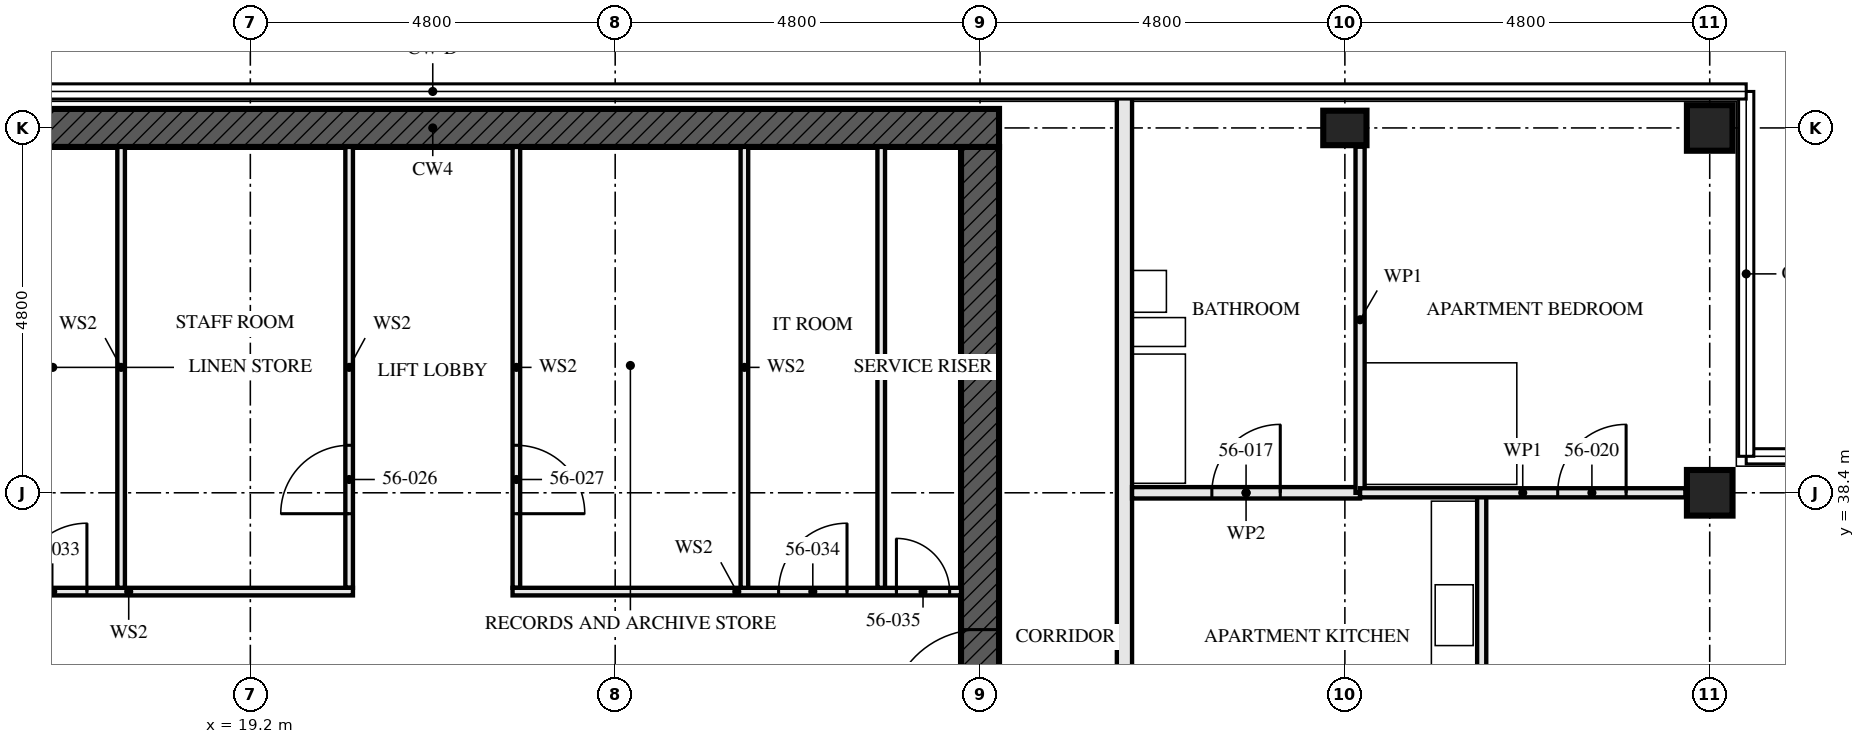
"""IFC4 building model, lengths in metres.
Left out: names, types, materials, properties, quantities, classifications, styles, units other than length and angle.
Written with IfcOpenShell. Run it as: python <this file> out.ifc"""

import sys

from ifc_helpers import new_model, si_unit, direction, frame, frame_2d, origin, origin_2d, place, context, subcontext, project, spatial, rectangle, hollow_rectangle, i_section, extrude, element, fill, save


model = new_model("IFC4")
c1 = context("Model", 3, precision=1e-05, world=origin(), true_north=direction((0.0, 1.0)))
c2 = subcontext(c1, "Body", "Model", "MODEL_VIEW")
j1 = project(units=[si_unit("LENGTHUNIT", "METRE"), si_unit("PLANEANGLEUNIT", "RADIAN")], contexts=[c1])
p1 = place(None, origin())
s1 = spatial("IfcSite", under=j1, at=p1, CompositionType="ELEMENT")
p2 = place(p1, origin())
s2 = spatial("IfcBuilding", under=s1, at=p2, CompositionType="ELEMENT")
p3 = place(p2, frame((0.0, 0.0, 205.0)))
s3 = spatial("IfcBuildingStorey", under=s2, at=p3, CompositionType="ELEMENT", Elevation=205.0)
p4 = place(p3, frame((33.6, 43.2, 0.0), z_axis=(0.0, 0.0, 1.0), x_axis=(0.0, 1.0, 0.0)))
e1 = element("IfcColumn", 1, at=p4, inside=s3, PredefinedType="COLUMN", context=c2, shape_type="SweptSolid", body=[
    extrude(i_section(OverallWidth=0.454, OverallDepth=0.569, WebThickness=0.078, FlangeThickness=0.125, FilletRadius=0.015, at=origin_2d()), origin(), (0.0, 0.0, 1.0), 3.5),
])
for number, where, z_axis, x_axis in (
    (2, (38.4, 38.4, 0.0), (0.0, 0.0, 1.0), (0.0, 1.0, 0.0)),
    (3, (38.4, 43.2, 0.0), (0.0, 0.0, 1.0), (0.0, 1.0, 0.0)),
):
    element("IfcColumn", number, at=place(p3, frame(where, z_axis=z_axis, x_axis=x_axis)), inside=s3, PredefinedType="COLUMN", context=c2, shape_type="SweptSolid", body=[
        extrude(hollow_rectangle(XDim=0.6, YDim=0.6, WallThickness=0.05, at=origin_2d()), origin(), (0.0, 0.0, 1.0), 3.5),
    ])
p5 = place(p3, frame((29.05, 43.2, -0.17), z_axis=(0.0, 0.0, 1.0), x_axis=(-1.0, 0.0, 0.0)))
e4 = element("IfcWall", 4, at=p5, inside=s3, PredefinedType="SHEAR", context=c2, shape_type="SweptSolid", body=[
    extrude(rectangle(XDim=14.9, YDim=0.5, at=frame_2d((7.45, 0.0))), origin(), (0.0, 0.0, 1.0), 3.5),
])
p6 = place(p3, frame((28.8, 29.05, -0.17), z_axis=(0.0, 0.0, 1.0), x_axis=(0.0, 1.0, 0.0)))
e5 = element("IfcWall", 5, at=p6, inside=s3, PredefinedType="SHEAR", context=c2, shape_type="SweptSolid", body=[
    extrude(rectangle(XDim=13.9, YDim=0.5, at=frame_2d((6.95, 0.0))), origin(), (0.0, 0.0, 1.0), 3.5),
])
p7 = place(p6, frame((6.35, 0.0, 0.17)))
e6 = element("IfcOpeningElement", 6, at=p7, cuts=e5, PredefinedType="OPENING", context=c2, shape_type="SweptSolid", body=[
    extrude(rectangle(XDim=1.2, YDim=2.1, at=frame_2d((0.6, 1.05))), frame((0.0, 0.26, 0.0), z_axis=(0.0, -1.0, 0.0), x_axis=(1.0, 0.0, 0.0)), (0.0, 0.0, 1.0), 0.521),
])
p8 = place(p3, frame((33.8, 38.4, 0.0), z_axis=(0.0, 0.0, 1.0), x_axis=(-1.0, 0.0, 0.0)))
e7 = element("IfcWall", 7, at=p8, inside=s3, PredefinedType="PARTITIONING", context=c2, shape_type="SweptSolid", body=[
    extrude(rectangle(XDim=3.0, YDim=0.15, at=frame_2d((1.5, 0.0))), origin(), (0.0, 0.0, 1.0), 2.55),
])
p9 = place(p8, frame((1.05, 0.0, 0.0)))
e8 = element("IfcOpeningElement", 8, at=p9, cuts=e7, PredefinedType="OPENING", context=c2, shape_type="SweptSolid", body=[
    extrude(rectangle(XDim=0.9, YDim=2.1, at=frame_2d((0.45, 1.05))), frame((0.0, 0.085, 0.0), z_axis=(0.0, -1.0, 0.0), x_axis=(1.0, 0.0, 0.0)), (0.0, 0.0, 1.0), 0.171),
])
p10 = place(p3, frame((35.4, 33.6, 0.0), z_axis=(0.0, 0.0, 1.0), x_axis=(0.0, 1.0, 0.0)))
e9 = element("IfcWall", 9, at=p10, inside=s3, PredefinedType="PARTITIONING", context=c2, shape_type="SweptSolid", body=[
    extrude(rectangle(XDim=4.8, YDim=0.12, at=frame_2d((2.4, 0.0))), origin(), (0.0, 0.0, 1.0), 3.33),
])
p11 = place(p10, frame((0.45, 0.0, 0.0)))
e10 = element("IfcOpeningElement", 10, at=p11, cuts=e9, PredefinedType="OPENING", context=c2, shape_type="SweptSolid", body=[
    extrude(rectangle(XDim=0.9, YDim=2.1, at=frame_2d((0.45, 1.05))), frame((0.0, 0.071, 0.0), z_axis=(0.0, -1.0, 0.0), x_axis=(1.0, 0.0, 0.0)), (0.0, 0.0, 1.0), 0.141),
])
p12 = place(p3, frame((33.8, 38.4, 0.0), z_axis=(0.0, 0.0, 1.0), x_axis=(0.0, 1.0, 0.0)))
e11 = element("IfcWall", 11, at=p12, inside=s3, PredefinedType="PARTITIONING", context=c2, shape_type="SweptSolid", body=[
    extrude(rectangle(XDim=4.553, YDim=0.12, at=frame_2d((2.276, 0.0))), origin(), (0.0, 0.0, 1.0), 3.33),
])
p13 = place(p3, frame((38.08, 38.4, 0.0), z_axis=(0.0, 0.0, 1.0), x_axis=(-1.0, 0.0, 0.0)))
e12 = element("IfcWall", 12, at=p13, inside=s3, PredefinedType="PARTITIONING", context=c2, shape_type="SweptSolid", body=[
    extrude(rectangle(XDim=4.28, YDim=0.12, at=frame_2d((2.14, 0.0))), origin(), (0.0, 0.0, 1.0), 2.55),
])
p14 = place(p13, frame((0.78, 0.0, 0.0)))
e13 = element("IfcOpeningElement", 13, at=p14, cuts=e12, PredefinedType="OPENING", context=c2, shape_type="SweptSolid", body=[
    extrude(rectangle(XDim=0.9, YDim=2.1, at=frame_2d((0.45, 1.05))), frame((0.0, 0.071, 0.0), z_axis=(0.0, -1.0, 0.0), x_axis=(1.0, 0.0, 0.0)), (0.0, 0.0, 1.0), 0.141),
])
p15 = place(p3, frame((30.7, 28.345, 0.0), z_axis=(0.0, 0.0, 1.0), x_axis=(0.0, 1.0, 0.0)))
e14 = element("IfcWall", 14, at=p15, inside=s3, PredefinedType="PARTITIONING", context=c2, shape_type="SweptSolid", body=[
    extrude(rectangle(XDim=15.31, YDim=0.2, at=frame_2d((7.655, 0.0))), origin(), (0.0, 0.0, 1.0), 2.32),
])
p16 = place(p15, frame((1.855, 0.0, 0.0)))
e15 = element("IfcOpeningElement", 15, at=p16, cuts=e14, PredefinedType="OPENING", context=c2, shape_type="SweptSolid", body=[
    extrude(rectangle(XDim=1.0, YDim=2.1, at=frame_2d((0.5, 1.05))), frame((0.0, 0.111, 0.0), z_axis=(0.0, -1.0, 0.0), x_axis=(1.0, 0.0, 0.0)), (0.0, 0.0, 1.0), 0.221),
])
p17 = place(p15, frame((4.555, 0.0, 0.0)))
e16 = element("IfcOpeningElement", 16, at=p17, cuts=e14, PredefinedType="OPENING", context=c2, shape_type="SweptSolid", body=[
    extrude(rectangle(XDim=1.0, YDim=2.1, at=frame_2d((0.5, 1.05))), frame((0.0, 0.111, 0.0), z_axis=(0.0, -1.0, 0.0), x_axis=(1.0, 0.0, 0.0)), (0.0, 0.0, 1.0), 0.221),
])
p18 = place(p15, frame((6.43, 0.0, 0.0)))
e17 = element("IfcOpeningElement", 17, at=p18, cuts=e14, PredefinedType="OPENING", context=c2, shape_type="SweptSolid", body=[
    extrude(rectangle(XDim=1.0, YDim=2.1, at=frame_2d((0.5, 1.05))), frame((0.0, 0.111, 0.0), z_axis=(0.0, -1.0, 0.0), x_axis=(1.0, 0.0, 0.0)), (0.0, 0.0, 1.0), 0.221),
])
p19 = place(p3, frame((27.5, 37.15, 0.0), z_axis=(0.0, 0.0, 1.0), x_axis=(0.0, 1.0, 0.0)))
e18 = element("IfcWall", 18, at=p19, inside=s3, PredefinedType="SOLIDWALL", context=c2, shape_type="SweptSolid", body=[
    extrude(rectangle(XDim=5.8, YDim=0.1, at=frame_2d((2.9, 0.0))), origin(), (0.0, 0.0, 1.0), 3.33),
])
p20 = place(p3, frame((20.5, 37.15, 0.0), z_axis=(0.0, 0.0, 1.0), x_axis=(0.0, 1.0, 0.0)))
e19 = element("IfcWall", 19, at=p20, inside=s3, PredefinedType="SOLIDWALL", context=c2, shape_type="SweptSolid", body=[
    extrude(rectangle(XDim=5.8, YDim=0.1, at=frame_2d((2.9, 0.0))), origin(), (0.0, 0.0, 1.0), 3.33),
])
p21 = place(p20, frame((0.975, 0.0, 0.0)))
e20 = element("IfcOpeningElement", 20, at=p21, cuts=e19, PredefinedType="OPENING", context=c2, shape_type="SweptSolid", body=[
    extrude(rectangle(XDim=0.9, YDim=2.1, at=frame_2d((0.45, 1.05))), frame((0.0, 0.061, 0.0), z_axis=(0.0, -1.0, 0.0), x_axis=(1.0, 0.0, 0.0)), (0.0, 0.0, 1.0), 0.121),
])
p22 = place(p3, frame((22.7, 37.15, 0.0), z_axis=(0.0, 0.0, 1.0), x_axis=(0.0, 1.0, 0.0)))
e21 = element("IfcWall", 21, at=p22, inside=s3, PredefinedType="SOLIDWALL", context=c2, shape_type="SweptSolid", body=[
    extrude(rectangle(XDim=5.8, YDim=0.1, at=frame_2d((2.9, 0.0))), origin(), (0.0, 0.0, 1.0), 3.33),
])
p23 = place(p22, frame((0.975, 0.0, 0.0)))
e22 = element("IfcOpeningElement", 22, at=p23, cuts=e21, PredefinedType="OPENING", context=c2, shape_type="SweptSolid", body=[
    extrude(rectangle(XDim=0.9, YDim=2.1, at=frame_2d((0.45, 1.05))), frame((0.0, 0.061, 0.0), z_axis=(0.0, -1.0, 0.0), x_axis=(1.0, 0.0, 0.0)), (0.0, 0.0, 1.0), 0.121),
])
p24 = place(p3, frame((14.65, 37.1, 0.0), z_axis=(0.0, 0.0, 1.0), x_axis=(1.0, 0.0, 0.0)))
e23 = element("IfcWall", 23, at=p24, inside=s3, PredefinedType="SOLIDWALL", context=c2, shape_type="SweptSolid", body=[
    extrude(rectangle(XDim=5.9, YDim=0.1, at=frame_2d((2.95, 0.0))), origin(), (0.0, 0.0, 1.0), 3.33),
])
p25 = place(p24, frame((0.15, 0.0, 0.0)))
e24 = element("IfcOpeningElement", 24, at=p25, cuts=e23, PredefinedType="OPENING", context=c2, shape_type="SweptSolid", body=[
    extrude(rectangle(XDim=0.7, YDim=2.1, at=frame_2d((0.35, 1.05))), frame((0.0, 0.061, 0.0), z_axis=(0.0, -1.0, 0.0), x_axis=(1.0, 0.0, 0.0)), (0.0, 0.0, 1.0), 0.121),
])
p26 = place(p24, frame((1.5, 0.0, 0.0)))
e25 = element("IfcOpeningElement", 25, at=p26, cuts=e23, PredefinedType="OPENING", context=c2, shape_type="SweptSolid", body=[
    extrude(rectangle(XDim=0.9, YDim=2.1, at=frame_2d((0.45, 1.05))), frame((0.0, 0.061, 0.0), z_axis=(0.0, -1.0, 0.0), x_axis=(1.0, 0.0, 0.0)), (0.0, 0.0, 1.0), 0.121),
])
p27 = place(p3, frame((22.65, 37.1, 0.0), z_axis=(0.0, 0.0, 1.0), x_axis=(1.0, 0.0, 0.0)))
e26 = element("IfcWall", 26, at=p27, inside=s3, PredefinedType="SOLIDWALL", context=c2, shape_type="SweptSolid", body=[
    extrude(rectangle(XDim=5.9, YDim=0.1, at=frame_2d((2.95, 0.0))), origin(), (0.0, 0.0, 1.0), 3.33),
])
p28 = place(p27, frame((3.5, 0.0, 0.0)))
e27 = element("IfcOpeningElement", 27, at=p28, cuts=e26, PredefinedType="OPENING", context=c2, shape_type="SweptSolid", body=[
    extrude(rectangle(XDim=0.9, YDim=2.1, at=frame_2d((0.45, 1.05))), frame((0.0, 0.061, 0.0), z_axis=(0.0, -1.0, 0.0), x_axis=(1.0, 0.0, 0.0)), (0.0, 0.0, 1.0), 0.121),
])
p29 = place(p27, frame((5.05, 0.0, 0.0)))
e28 = element("IfcOpeningElement", 28, at=p29, cuts=e26, PredefinedType="OPENING", context=c2, shape_type="SweptSolid", body=[
    extrude(rectangle(XDim=0.7, YDim=2.1, at=frame_2d((0.35, 1.05))), frame((0.0, 0.061, 0.0), z_axis=(0.0, -1.0, 0.0), x_axis=(1.0, 0.0, 0.0)), (0.0, 0.0, 1.0), 0.121),
])
for number, where, z_axis, x_axis in (
    (29, (17.5, 37.15, 0.0), (0.0, 0.0, 1.0), (0.0, 1.0, 0.0)),
    (30, (25.7, 37.15, 0.0), (0.0, 0.0, 1.0), (0.0, 1.0, 0.0)),
):
    element("IfcWall", number, at=place(p3, frame(where, z_axis=z_axis, x_axis=x_axis)), inside=s3, PredefinedType="SOLIDWALL", context=c2, shape_type="SweptSolid", body=[
        extrude(rectangle(XDim=5.8, YDim=0.1, at=frame_2d((2.9, 0.0))), origin(), (0.0, 0.0, 1.0), 3.33),
    ])
p30 = place(p9, frame((0.9, 0.0, 0.0), z_axis=(0.0, 0.0, 1.0), x_axis=(-1.0, 0.0, 0.0)))
e31 = element("IfcDoor", 31, at=p30, inside=s3, OperationType="SINGLE_SWING_LEFT", PredefinedType="DOOR", context=c2, shape_type="SweptSolid", body=[
    extrude(rectangle(XDim=0.9, YDim=2.1, at=frame_2d((0.45, 1.05))), frame((0.0, 0.022, 0.0), z_axis=(0.0, -1.0, 0.0), x_axis=(1.0, 0.0, 0.0)), (0.0, 0.0, 1.0), 0.044),
])
fill(e8, e31)
p31 = place(p14, frame((0.9, 0.0, 0.0), z_axis=(0.0, 0.0, 1.0), x_axis=(-1.0, 0.0, 0.0)))
e32 = element("IfcDoor", 32, at=p31, inside=s3, OperationType="SINGLE_SWING_LEFT", PredefinedType="DOOR", context=c2, shape_type="SweptSolid", body=[
    extrude(rectangle(XDim=0.9, YDim=2.1, at=frame_2d((0.45, 1.05))), frame((0.0, 0.022, 0.0), z_axis=(0.0, -1.0, 0.0), x_axis=(1.0, 0.0, 0.0)), (0.0, 0.0, 1.0), 0.044),
])
fill(e13, e32)
p32 = place(p21, origin())
e33 = element("IfcDoor", 33, at=p32, inside=s3, OperationType="SINGLE_SWING_RIGHT", PredefinedType="DOOR", context=c2, shape_type="SweptSolid", body=[
    extrude(rectangle(XDim=0.9, YDim=2.1, at=frame_2d((0.45, 1.05))), frame((0.0, 0.027, 0.0), z_axis=(0.0, -1.0, 0.0), x_axis=(1.0, 0.0, 0.0)), (0.0, 0.0, 1.0), 0.054),
])
fill(e20, e33)
p33 = place(p23, frame((0.9, 0.0, 0.0), z_axis=(0.0, 0.0, 1.0), x_axis=(-1.0, 0.0, 0.0)))
e34 = element("IfcDoor", 34, at=p33, inside=s3, OperationType="SINGLE_SWING_LEFT", PredefinedType="DOOR", context=c2, shape_type="SweptSolid", body=[
    extrude(rectangle(XDim=0.9, YDim=2.1, at=frame_2d((0.45, 1.05))), frame((0.0, 0.027, 0.0), z_axis=(0.0, -1.0, 0.0), x_axis=(1.0, 0.0, 0.0)), (0.0, 0.0, 1.0), 0.054),
])
fill(e22, e34)
p34 = place(p26, origin())
e35 = element("IfcDoor", 35, at=p34, inside=s3, OperationType="SINGLE_SWING_LEFT", PredefinedType="DOOR", context=c2, shape_type="SweptSolid", body=[
    extrude(rectangle(XDim=0.9, YDim=2.1, at=frame_2d((0.45, 1.05))), frame((0.0, 0.027, 0.0), z_axis=(0.0, -1.0, 0.0), x_axis=(1.0, 0.0, 0.0)), (0.0, 0.0, 1.0), 0.054),
])
fill(e25, e35)
p35 = place(p28, origin())
e36 = element("IfcDoor", 36, at=p35, inside=s3, OperationType="SINGLE_SWING_LEFT", PredefinedType="DOOR", context=c2, shape_type="SweptSolid", body=[
    extrude(rectangle(XDim=0.9, YDim=2.1, at=frame_2d((0.45, 1.05))), frame((0.0, 0.027, 0.0), z_axis=(0.0, -1.0, 0.0), x_axis=(1.0, 0.0, 0.0)), (0.0, 0.0, 1.0), 0.054),
])
fill(e27, e36)
p36 = place(p29, origin())
e37 = element("IfcDoor", 37, at=p36, inside=s3, OperationType="SINGLE_SWING_RIGHT", PredefinedType="DOOR", context=c2, shape_type="SweptSolid", body=[
    extrude(rectangle(XDim=0.7, YDim=2.1, at=frame_2d((0.35, 1.05))), frame((0.0, 0.027, 0.0), z_axis=(0.0, -1.0, 0.0), x_axis=(1.0, 0.0, 0.0)), (0.0, 0.0, 1.0), 0.054),
])
fill(e28, e37)
p37 = place(p7, origin())
e38 = element("IfcDoor", 38, at=p37, inside=s3, OperationType="SINGLE_SWING_LEFT", PredefinedType="DOOR", context=c2, shape_type="SweptSolid", body=[
    extrude(rectangle(XDim=1.2, YDim=2.1, at=frame_2d((0.6, 1.05))), frame((0.0, 0.027, 0.0), z_axis=(0.0, -1.0, 0.0), x_axis=(1.0, 0.0, 0.0)), (0.0, 0.0, 1.0), 0.054),
])
fill(e6, e38)
save(model, sys.argv[1])
